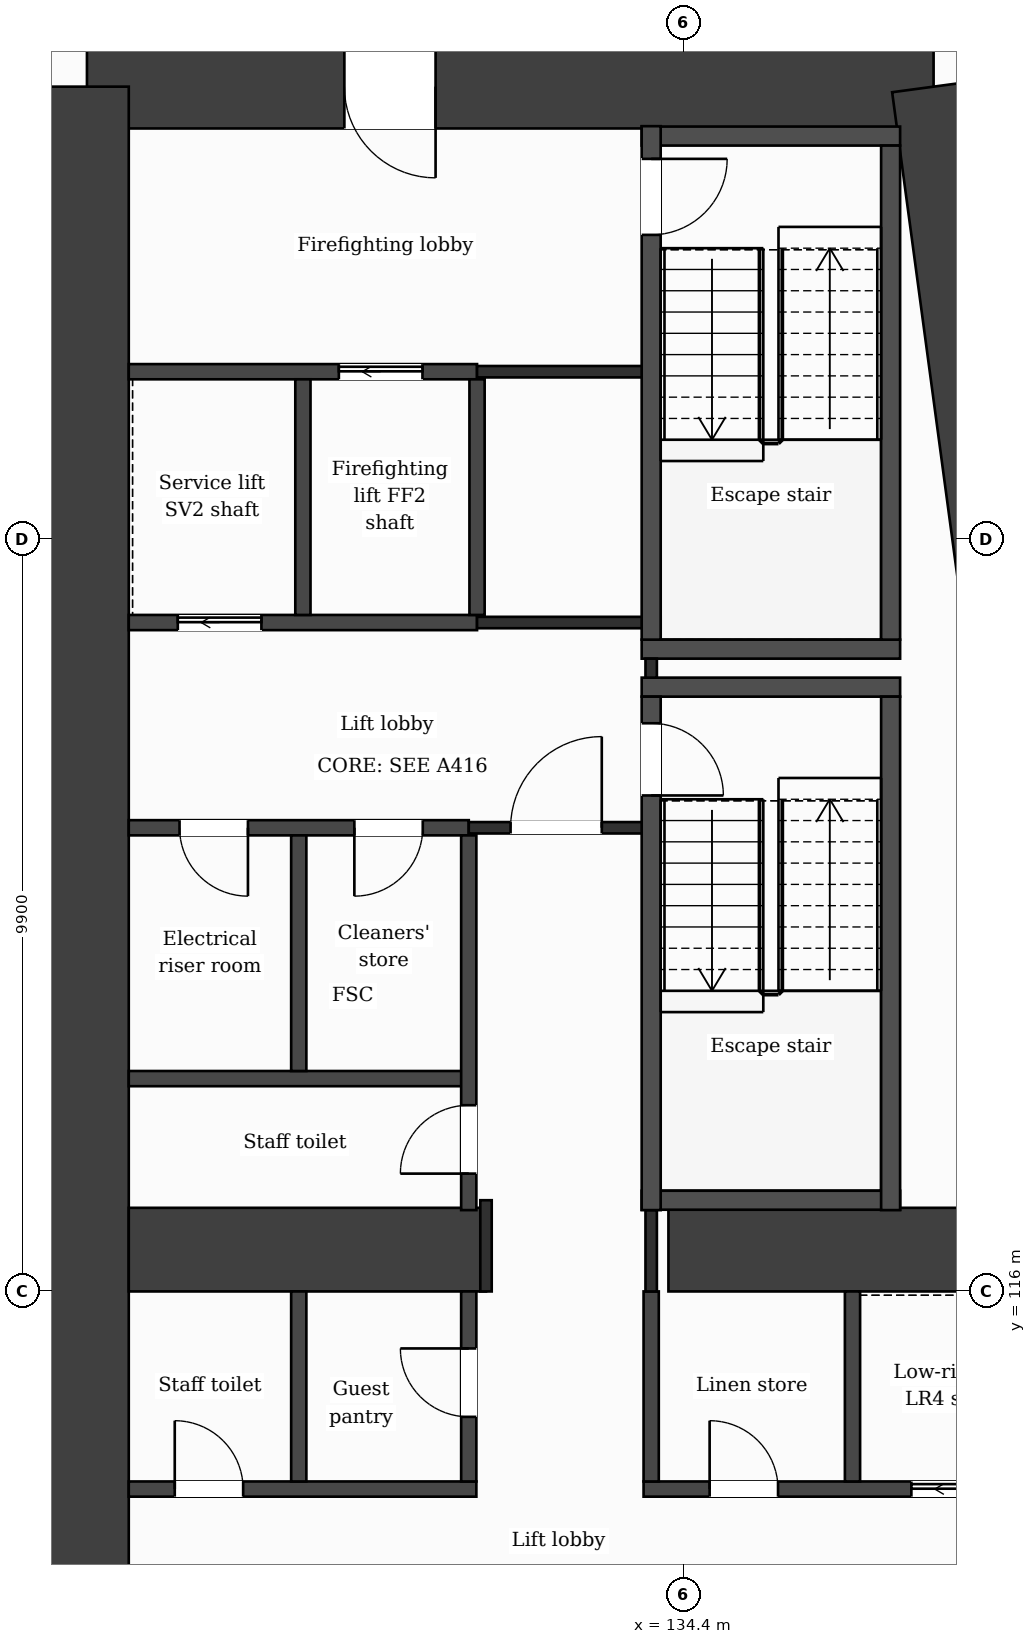
"""IFC4 building model, lengths in metres.
Left out: names, types, materials, properties, quantities, classifications, styles, units other than length and angle.
Written with IfcOpenShell. Run it as: python <this file> out.ifc"""

import sys

from ifc_helpers import new_model, si_unit, direction, frame, frame_2d, origin, place, context, subcontext, project, spatial, rectangle, extrude, element, fill, save


model = new_model("IFC4")
c1 = context("Model", 3, precision=1e-05, world=origin(), true_north=direction((0.0, 1.0)))
c2 = subcontext(c1, "Body", "Model", "MODEL_VIEW")
j1 = project(units=[si_unit("LENGTHUNIT", "METRE"), si_unit("PLANEANGLEUNIT", "RADIAN")], contexts=[c1])
p1 = place(None, origin())
s1 = spatial("IfcSite", under=j1, at=p1, CompositionType="ELEMENT")
p2 = place(p1, origin())
s2 = spatial("IfcBuilding", under=s1, at=p2, CompositionType="ELEMENT")
p3 = place(p2, frame((0.0, 0.0, 70.5)))
s3 = spatial("IfcBuildingStorey", under=s2, at=p3, CompositionType="ELEMENT", Elevation=70.5)
p4 = place(p3, frame((126.55, 131.85, 0.0), z_axis=(0.0, 0.0, 1.0), x_axis=(1.0, 0.0, 0.0)))
e1 = element("IfcWall", 1, at=p4, inside=s3, PredefinedType="SHEAR", context=c2, shape_type="SweptSolid", body=[
    extrude(rectangle(XDim=11.138, YDim=1.1, at=frame_2d((5.569, 0.0))), origin(), (0.0, 0.0, 1.0), 3.5),
])
p5 = place(p4, frame((3.386, 0.0, 0.0)))
e2 = element("IfcOpeningElement", 2, at=p5, cuts=e1, PredefinedType="OPENING", context=c2, shape_type="SweptSolid", body=[
    extrude(rectangle(XDim=1.2, YDim=2.1, at=frame_2d((0.6, 1.05))), frame((0.0, 0.56, 0.0), z_axis=(0.0, -1.0, 0.0), x_axis=(1.0, 0.0, 0.0)), (0.0, 0.0, 1.0), 1.12),
])
p6 = place(p3, frame((137.688, 131.85, 0.0), z_axis=(0.0, 0.0, 1.0), x_axis=(0.133411793472, -0.991060691059, 0.0)))
e3 = element("IfcWall", 3, at=p6, inside=s3, PredefinedType="SHEAR", context=c2, shape_type="SweptSolid", body=[
    extrude(rectangle(XDim=21.089, YDim=1.1, at=frame_2d((10.544, 0.0))), origin(), (0.0, 0.0, 1.0), 3.5),
])
p7 = place(p3, frame((126.55, 110.95, 0.0), z_axis=(0.0, 0.0, 1.0), x_axis=(0.0, 1.0, 0.0)))
e4 = element("IfcWall", 4, at=p7, inside=s3, PredefinedType="SHEAR", context=c2, shape_type="SweptSolid", body=[
    extrude(rectangle(XDim=20.9, YDim=1.1, at=frame_2d((10.45, 0.0))), origin(), (0.0, 0.0, 1.0), 3.5),
])
p8 = place(p3, frame((127.1, 116.55, 0.0), z_axis=(0.0, 0.0, 1.0), x_axis=(1.0, 0.0, 0.0)))
e5 = element("IfcWall", 5, at=p8, inside=s3, PredefinedType="SHEAR", context=c2, shape_type="SweptSolid", body=[
    extrude(rectangle(XDim=4.7, YDim=1.1, at=frame_2d((2.35, 0.0))), origin(), (0.0, 0.0, 1.0), 3.5),
])
p9 = place(p3, frame((134.2, 116.55, 0.0), z_axis=(0.0, 0.0, 1.0), x_axis=(1.0, 0.0, 0.0)))
e6 = element("IfcWall", 6, at=p9, inside=s3, PredefinedType="SHEAR", context=c2, shape_type="SweptSolid", body=[
    extrude(rectangle(XDim=5.077, YDim=1.1, at=frame_2d((2.539, 0.0))), origin(), (0.0, 0.0, 1.0), 3.5),
])
p10 = place(p3, frame((127.1, 113.4, 0.0), z_axis=(0.0, 0.0, 1.0), x_axis=(1.0, 0.0, 0.0)))
e7 = element("IfcWall", 7, at=p10, inside=s3, PredefinedType="PARTITIONING", context=c2, shape_type="SweptSolid", body=[
    extrude(rectangle(XDim=4.573, YDim=0.2, at=frame_2d((2.287, 0.0))), origin(), (0.0, 0.0, 1.0), 3.18),
])
p11 = place(p10, frame((0.605, 0.0, 0.0)))
e8 = element("IfcOpeningElement", 8, at=p11, cuts=e7, PredefinedType="OPENING", context=c2, shape_type="SweptSolid", body=[
    extrude(rectangle(XDim=0.9, YDim=2.1, at=frame_2d((0.45, 1.05))), frame((0.0, 0.11, 0.0), z_axis=(0.0, -1.0, 0.0), x_axis=(1.0, 0.0, 0.0)), (0.0, 0.0, 1.0), 0.22),
])
p12 = place(p3, frame((133.873, 113.4, 0.0), z_axis=(0.0, 0.0, 1.0), x_axis=(1.0, 0.0, 0.0)))
e9 = element("IfcWall", 9, at=p12, inside=s3, PredefinedType="PARTITIONING", context=c2, shape_type="SweptSolid", body=[
    extrude(rectangle(XDim=5.774, YDim=0.2, at=frame_2d((2.887, 0.0))), origin(), (0.0, 0.0, 1.0), 3.18),
])
p13 = place(p12, frame((3.523, 0.0, 0.0)))
e10 = element("IfcOpeningElement", 10, at=p13, cuts=e9, PredefinedType="OPENING", context=c2, shape_type="SweptSolid", body=[
    extrude(rectangle(XDim=1.1, YDim=2.1, at=frame_2d((0.55, 1.05))), frame((0.0, 0.11, 0.0), z_axis=(0.0, -1.0, 0.0), x_axis=(1.0, 0.0, 0.0)), (0.0, 0.0, 1.0), 0.22),
])
p14 = place(p12, frame((0.869, 0.0, 0.0)))
e11 = element("IfcOpeningElement", 11, at=p14, cuts=e9, PredefinedType="OPENING", context=c2, shape_type="SweptSolid", body=[
    extrude(rectangle(XDim=0.9, YDim=2.1, at=frame_2d((0.45, 1.05))), frame((0.0, 0.11, 0.0), z_axis=(0.0, -1.0, 0.0), x_axis=(1.0, 0.0, 0.0)), (0.0, 0.0, 1.0), 0.22),
])
p15 = place(p3, frame((133.848, 117.2, 0.0), z_axis=(0.0, 0.0, 1.0), x_axis=(1.0, 0.0, 0.0)))
e12 = element("IfcWall", 12, at=p15, inside=s3, PredefinedType="PARTITIONING", context=c2, shape_type="SweptSolid", body=[
    extrude(rectangle(XDim=3.4, YDim=0.25, at=frame_2d((1.7, 0.0))), origin(), (0.0, 0.0, 1.0), 3.18),
])
p16 = place(p3, frame((127.1, 118.8, 0.0), z_axis=(0.0, 0.0, 1.0), x_axis=(1.0, 0.0, 0.0)))
e13 = element("IfcWall", 13, at=p16, inside=s3, PredefinedType="PARTITIONING", context=c2, shape_type="SweptSolid", body=[
    extrude(rectangle(XDim=4.473, YDim=0.2, at=frame_2d((2.236, 0.0))), origin(), (0.0, 0.0, 1.0), 3.18),
])
p17 = place(p3, frame((127.1, 122.1, 0.0), z_axis=(0.0, 0.0, 1.0), x_axis=(1.0, 0.0, 0.0)))
e14 = element("IfcWall", 14, at=p17, inside=s3, PredefinedType="PARTITIONING", context=c2, shape_type="SweptSolid", body=[
    extrude(rectangle(XDim=4.473, YDim=0.2, at=frame_2d((2.236, 0.0))), origin(), (0.0, 0.0, 1.0), 3.18),
])
p18 = place(p17, frame((2.968, 0.0, 0.0)))
e15 = element("IfcOpeningElement", 15, at=p18, cuts=e14, PredefinedType="OPENING", context=c2, shape_type="SweptSolid", body=[
    extrude(rectangle(XDim=0.9, YDim=2.1, at=frame_2d((0.45, 1.05))), frame((0.0, 0.11, 0.0), z_axis=(0.0, -1.0, 0.0), x_axis=(1.0, 0.0, 0.0)), (0.0, 0.0, 1.0), 0.22),
])
p19 = place(p17, frame((0.668, 0.0, 0.0)))
e16 = element("IfcOpeningElement", 16, at=p19, cuts=e14, PredefinedType="OPENING", context=c2, shape_type="SweptSolid", body=[
    extrude(rectangle(XDim=0.9, YDim=2.1, at=frame_2d((0.45, 1.05))), frame((0.0, 0.11, 0.0), z_axis=(0.0, -1.0, 0.0), x_axis=(1.0, 0.0, 0.0)), (0.0, 0.0, 1.0), 0.22),
])
p20 = place(p3, frame((131.573, 122.1, 0.0), z_axis=(0.0, 0.0, 1.0), x_axis=(1.0, 0.0, 0.0)))
e17 = element("IfcWall", 17, at=p20, inside=s3, PredefinedType="PARTITIONING", context=c2, shape_type="SweptSolid", body=[
    extrude(rectangle(XDim=2.4, YDim=0.15, at=frame_2d((1.2, 0.0))), origin(), (0.0, 0.0, 1.0), 3.18),
])
p21 = place(p20, frame((0.55, 0.0, 0.0)))
e18 = element("IfcOpeningElement", 18, at=p21, cuts=e17, PredefinedType="OPENING", context=c2, shape_type="SweptSolid", body=[
    extrude(rectangle(XDim=1.2, YDim=2.1, at=frame_2d((0.6, 1.05))), frame((0.0, 0.085, 0.0), z_axis=(0.0, -1.0, 0.0), x_axis=(1.0, 0.0, 0.0)), (0.0, 0.0, 1.0), 0.17),
])
for number, where, z_axis, x_axis in (
    (19, (133.848, 123.95, 0.0), (0.0, 0.0, 1.0), (1.0, 0.0, 0.0)),
    (20, (133.848, 124.45, 0.0), (0.0, 0.0, 1.0), (1.0, 0.0, 0.0)),
):
    element("IfcWall", number, at=place(p3, frame(where, z_axis=z_axis, x_axis=x_axis)), inside=s3, PredefinedType="PARTITIONING", context=c2, shape_type="SweptSolid", body=[
        extrude(rectangle(XDim=3.4, YDim=0.25, at=frame_2d((1.7, 0.0))), origin(), (0.0, 0.0, 1.0), 3.18),
    ])
p22 = place(p3, frame((127.1, 124.8, 0.0), z_axis=(0.0, 0.0, 1.0), x_axis=(1.0, 0.0, 0.0)))
e21 = element("IfcWall", 21, at=p22, inside=s3, PredefinedType="PARTITIONING", context=c2, shape_type="SweptSolid", body=[
    extrude(rectangle(XDim=4.582, YDim=0.2, at=frame_2d((2.291, 0.0))), origin(), (0.0, 0.0, 1.0), 3.18),
])
p23 = place(p22, frame((0.645, 0.0, 0.0)))
e22 = element("IfcOpeningElement", 22, at=p23, cuts=e21, PredefinedType="OPENING", context=c2, shape_type="SweptSolid", body=[
    extrude(rectangle(XDim=1.1, YDim=2.1, at=frame_2d((0.55, 1.05))), frame((0.0, 0.11, 0.0), z_axis=(0.0, -1.0, 0.0), x_axis=(1.0, 0.0, 0.0)), (0.0, 0.0, 1.0), 0.22),
])
p24 = place(p3, frame((131.682, 124.8, 0.0), z_axis=(0.0, 0.0, 1.0), x_axis=(1.0, 0.0, 0.0)))
e23 = element("IfcWall", 23, at=p24, inside=s3, PredefinedType="PARTITIONING", context=c2, shape_type="SweptSolid", body=[
    extrude(rectangle(XDim=2.416, YDim=0.15, at=frame_2d((1.208, 0.0))), origin(), (0.0, 0.0, 1.0), 3.18),
])
p25 = place(p3, frame((127.1, 128.1, 0.0), z_axis=(0.0, 0.0, 1.0), x_axis=(1.0, 0.0, 0.0)))
e24 = element("IfcWall", 24, at=p25, inside=s3, PredefinedType="PARTITIONING", context=c2, shape_type="SweptSolid", body=[
    extrude(rectangle(XDim=4.582, YDim=0.2, at=frame_2d((2.291, 0.0))), origin(), (0.0, 0.0, 1.0), 3.18),
])
p26 = place(p25, frame((2.764, 0.0, 0.0)))
e25 = element("IfcOpeningElement", 25, at=p26, cuts=e24, PredefinedType="OPENING", context=c2, shape_type="SweptSolid", body=[
    extrude(rectangle(XDim=1.1, YDim=2.1, at=frame_2d((0.55, 1.05))), frame((0.0, 0.11, 0.0), z_axis=(0.0, -1.0, 0.0), x_axis=(1.0, 0.0, 0.0)), (0.0, 0.0, 1.0), 0.22),
])
p27 = place(p3, frame((131.682, 128.1, 0.0), z_axis=(0.0, 0.0, 1.0), x_axis=(1.0, 0.0, 0.0)))
e26 = element("IfcWall", 26, at=p27, inside=s3, PredefinedType="PARTITIONING", context=c2, shape_type="SweptSolid", body=[
    extrude(rectangle(XDim=2.291, YDim=0.15, at=frame_2d((1.146, 0.0))), origin(), (0.0, 0.0, 1.0), 3.18),
])
p28 = place(p3, frame((133.848, 131.2, 0.0), z_axis=(0.0, 0.0, 1.0), x_axis=(1.0, 0.0, 0.0)))
e27 = element("IfcWall", 27, at=p28, inside=s3, PredefinedType="PARTITIONING", context=c2, shape_type="SweptSolid", body=[
    extrude(rectangle(XDim=3.4, YDim=0.25, at=frame_2d((1.7, 0.0))), origin(), (0.0, 0.0, 1.0), 3.18),
])
p29 = place(p3, frame((129.336, 113.5, 0.0), z_axis=(0.0, 0.0, 1.0), x_axis=(0.0, 1.0, 0.0)))
e28 = element("IfcWall", 28, at=p29, inside=s3, PredefinedType="PARTITIONING", context=c2, shape_type="SweptSolid", body=[
    extrude(rectangle(XDim=2.5, YDim=0.2, at=frame_2d((1.25, 0.0))), origin(), (0.0, 0.0, 1.0), 3.18),
])
for number, where, z_axis, x_axis in (
    (29, (129.336, 118.9, 0.0), (0.0, 0.0, 1.0), (0.0, 1.0, 0.0)),
    (30, (129.391, 124.9, 0.0), (0.0, 0.0, 1.0), (0.0, 1.0, 0.0)),
):
    element("IfcWall", number, at=place(p3, frame(where, z_axis=z_axis, x_axis=x_axis)), inside=s3, PredefinedType="PARTITIONING", context=c2, shape_type="SweptSolid", body=[
        extrude(rectangle(XDim=3.1, YDim=0.2, at=frame_2d((1.55, 0.0))), origin(), (0.0, 0.0, 1.0), 3.18),
    ])
p30 = place(p3, frame((131.573, 113.5, 0.0), z_axis=(0.0, 0.0, 1.0), x_axis=(0.0, 1.0, 0.0)))
e31 = element("IfcWall", 31, at=p30, inside=s3, PredefinedType="PARTITIONING", context=c2, shape_type="SweptSolid", body=[
    extrude(rectangle(XDim=2.5, YDim=0.2, at=frame_2d((1.25, 0.0))), origin(), (0.0, 0.0, 1.0), 3.18),
])
p31 = place(p30, frame((0.85, 0.0, 0.0)))
e32 = element("IfcOpeningElement", 32, at=p31, cuts=e31, PredefinedType="OPENING", context=c2, shape_type="SweptSolid", body=[
    extrude(rectangle(XDim=0.9, YDim=2.1, at=frame_2d((0.45, 1.05))), frame((0.0, 0.11, 0.0), z_axis=(0.0, -1.0, 0.0), x_axis=(1.0, 0.0, 0.0)), (0.0, 0.0, 1.0), 0.22),
])
p32 = place(p3, frame((131.573, 117.07, 0.0), z_axis=(0.0, 0.0, 1.0), x_axis=(0.0, 1.0, 0.0)))
e33 = element("IfcWall", 33, at=p32, inside=s3, PredefinedType="PARTITIONING", context=c2, shape_type="SweptSolid", body=[
    extrude(rectangle(XDim=4.93, YDim=0.2, at=frame_2d((2.465, 0.0))), origin(), (0.0, 0.0, 1.0), 3.18),
])
p33 = place(p32, frame((0.48, 0.0, 0.0)))
e34 = element("IfcOpeningElement", 34, at=p33, cuts=e33, PredefinedType="OPENING", context=c2, shape_type="SweptSolid", body=[
    extrude(rectangle(XDim=0.9, YDim=2.1, at=frame_2d((0.45, 1.05))), frame((0.0, 0.11, 0.0), z_axis=(0.0, -1.0, 0.0), x_axis=(1.0, 0.0, 0.0)), (0.0, 0.0, 1.0), 0.22),
])
p34 = place(p3, frame((131.682, 124.9, 0.0), z_axis=(0.0, 0.0, 1.0), x_axis=(0.0, 1.0, 0.0)))
e35 = element("IfcWall", 35, at=p34, inside=s3, PredefinedType="PARTITIONING", context=c2, shape_type="SweptSolid", body=[
    extrude(rectangle(XDim=3.1, YDim=0.2, at=frame_2d((1.55, 0.0))), origin(), (0.0, 0.0, 1.0), 3.18),
])
p35 = place(p3, frame((131.8, 116.0, 0.0), z_axis=(0.0, 0.0, 1.0), x_axis=(0.0, 1.0, 0.0)))
e36 = element("IfcWall", 36, at=p35, inside=s3, PredefinedType="PARTITIONING", context=c2, shape_type="SweptSolid", body=[
    extrude(rectangle(XDim=1.2, YDim=0.15, at=frame_2d((0.6, 0.0))), origin(), (0.0, 0.0, 1.0), 3.18),
])
p36 = place(p3, frame((133.973, 113.5, 0.0), z_axis=(0.0, 0.0, 1.0), x_axis=(0.0, 1.0, 0.0)))
e37 = element("IfcWall", 37, at=p36, inside=s3, PredefinedType="PARTITIONING", context=c2, shape_type="SweptSolid", body=[
    extrude(rectangle(XDim=2.5, YDim=0.2, at=frame_2d((1.25, 0.0))), origin(), (0.0, 0.0, 1.0), 3.18),
])
p37 = place(p3, frame((133.973, 116.0, 0.0), z_axis=(0.0, 0.0, 1.0), x_axis=(0.0, 1.0, 0.0)))
e38 = element("IfcWall", 38, at=p37, inside=s3, PredefinedType="PARTITIONING", context=c2, shape_type="SweptSolid", body=[
    extrude(rectangle(XDim=1.07, YDim=0.15, at=frame_2d((0.535, 0.0))), origin(), (0.0, 0.0, 1.0), 3.18),
])
p38 = place(p3, frame((133.973, 124.075, 0.0), z_axis=(0.0, 0.0, 1.0), x_axis=(0.0, 1.0, 0.0)))
e39 = element("IfcWall", 39, at=p38, inside=s3, PredefinedType="PARTITIONING", context=c2, shape_type="SweptSolid", body=[
    extrude(rectangle(XDim=0.25, YDim=0.15, at=frame_2d((0.125, 0.0))), origin(), (0.0, 0.0, 1.0), 3.18),
])
p39 = place(p3, frame((133.973, 117.07, 0.0), z_axis=(0.0, 0.0, 1.0), x_axis=(0.0, 1.0, 0.0)))
e40 = element("IfcWall", 40, at=p39, inside=s3, PredefinedType="PARTITIONING", context=c2, shape_type="SweptSolid", body=[
    extrude(rectangle(XDim=6.755, YDim=0.25, at=frame_2d((3.377, 0.0))), origin(), (0.0, 0.0, 1.0), 3.18),
])
p40 = place(p39, frame((5.455, 0.0, 0.0)))
e41 = element("IfcOpeningElement", 41, at=p40, cuts=e40, PredefinedType="OPENING", context=c2, shape_type="SweptSolid", body=[
    extrude(rectangle(XDim=0.95, YDim=2.1, at=frame_2d((0.475, 1.05))), frame((0.0, 0.135, 0.0), z_axis=(0.0, -1.0, 0.0), x_axis=(1.0, 0.0, 0.0)), (0.0, 0.0, 1.0), 0.27),
])
p41 = place(p3, frame((133.973, 124.575, 0.0), z_axis=(0.0, 0.0, 1.0), x_axis=(0.0, 1.0, 0.0)))
e42 = element("IfcWall", 42, at=p41, inside=s3, PredefinedType="PARTITIONING", context=c2, shape_type="SweptSolid", body=[
    extrude(rectangle(XDim=6.755, YDim=0.25, at=frame_2d((3.377, 0.0))), origin(), (0.0, 0.0, 1.0), 3.18),
])
p42 = place(p41, frame((5.325, 0.0, 0.0)))
e43 = element("IfcOpeningElement", 43, at=p42, cuts=e42, PredefinedType="OPENING", context=c2, shape_type="SweptSolid", body=[
    extrude(rectangle(XDim=1.0, YDim=2.1, at=frame_2d((0.5, 1.05))), frame((0.0, 0.135, 0.0), z_axis=(0.0, -1.0, 0.0), x_axis=(1.0, 0.0, 0.0)), (0.0, 0.0, 1.0), 0.27),
])
p43 = place(p3, frame((136.622, 113.5, 0.0), z_axis=(0.0, 0.0, 1.0), x_axis=(0.0, 1.0, 0.0)))
e44 = element("IfcWall", 44, at=p43, inside=s3, PredefinedType="PARTITIONING", context=c2, shape_type="SweptSolid", body=[
    extrude(rectangle(XDim=2.5, YDim=0.2, at=frame_2d((1.25, 0.0))), origin(), (0.0, 0.0, 1.0), 3.18),
])
p44 = place(p3, frame((137.123, 117.07, 0.0), z_axis=(0.0, 0.0, 1.0), x_axis=(0.0, 1.0, 0.0)))
e45 = element("IfcWall", 45, at=p44, inside=s3, PredefinedType="PARTITIONING", context=c2, shape_type="SweptSolid", body=[
    extrude(rectangle(XDim=6.755, YDim=0.25, at=frame_2d((3.377, 0.0))), origin(), (0.0, 0.0, 1.0), 3.18),
])
p45 = place(p3, frame((137.123, 124.575, 0.0), z_axis=(0.0, 0.0, 1.0), x_axis=(0.0, 1.0, 0.0)))
e46 = element("IfcWall", 46, at=p45, inside=s3, PredefinedType="PARTITIONING", context=c2, shape_type="SweptSolid", body=[
    extrude(rectangle(XDim=6.5, YDim=0.25, at=frame_2d((3.25, 0.0))), origin(), (0.0, 0.0, 1.0), 3.18),
])
p46 = place(p21, origin())
e47 = element("IfcDoor", 47, at=p46, inside=s3, OperationType="SINGLE_SWING_RIGHT", PredefinedType="DOOR", context=c2, shape_type="SweptSolid", body=[
    extrude(rectangle(XDim=1.2, YDim=2.1, at=frame_2d((0.6, 1.05))), frame((0.0, 0.025, 0.0), z_axis=(0.0, -1.0, 0.0), x_axis=(1.0, 0.0, 0.0)), (0.0, 0.0, 1.0), 0.05),
])
fill(e18, e47)
p47 = place(p26, origin())
e48 = element("IfcDoor", 48, at=p47, inside=s3, OperationType="SLIDING_TO_LEFT", PredefinedType="DOOR", context=c2, shape_type="SweptSolid", body=[
    extrude(rectangle(XDim=1.1, YDim=2.1, at=frame_2d((0.55, 1.05))), frame((0.0, 0.025, 0.0), z_axis=(0.0, -1.0, 0.0), x_axis=(1.0, 0.0, 0.0)), (0.0, 0.0, 1.0), 0.05),
])
fill(e25, e48)
p48 = place(p23, origin())
e49 = element("IfcDoor", 49, at=p48, inside=s3, OperationType="SLIDING_TO_LEFT", PredefinedType="DOOR", context=c2, shape_type="SweptSolid", body=[
    extrude(rectangle(XDim=1.1, YDim=2.1, at=frame_2d((0.55, 1.05))), frame((0.0, 0.025, 0.0), z_axis=(0.0, -1.0, 0.0), x_axis=(1.0, 0.0, 0.0)), (0.0, 0.0, 1.0), 0.05),
])
fill(e22, e49)
p49 = place(p18, origin())
e50 = element("IfcDoor", 50, at=p49, inside=s3, OperationType="SINGLE_SWING_LEFT", PredefinedType="DOOR", context=c2, shape_type="SweptSolid", body=[
    extrude(rectangle(XDim=0.9, YDim=2.1, at=frame_2d((0.45, 1.05))), frame((0.0, 0.025, 0.0), z_axis=(0.0, -1.0, 0.0), x_axis=(1.0, 0.0, 0.0)), (0.0, 0.0, 1.0), 0.05),
])
fill(e15, e50)
p50 = place(p19, origin())
e51 = element("IfcDoor", 51, at=p50, inside=s3, OperationType="SINGLE_SWING_RIGHT", PredefinedType="DOOR", context=c2, shape_type="SweptSolid", body=[
    extrude(rectangle(XDim=0.9, YDim=2.1, at=frame_2d((0.45, 1.05))), frame((0.0, 0.025, 0.0), z_axis=(0.0, -1.0, 0.0), x_axis=(1.0, 0.0, 0.0)), (0.0, 0.0, 1.0), 0.05),
])
fill(e16, e51)
p51 = place(p40, origin())
e52 = element("IfcDoor", 52, at=p51, inside=s3, OperationType="SINGLE_SWING_LEFT", PredefinedType="DOOR", context=c2, shape_type="SweptSolid", body=[
    extrude(rectangle(XDim=0.95, YDim=2.1, at=frame_2d((0.475, 1.05))), frame((0.0, 0.025, 0.0), z_axis=(0.0, -1.0, 0.0), x_axis=(1.0, 0.0, 0.0)), (0.0, 0.0, 1.0), 0.05),
])
fill(e41, e52)
p52 = place(p42, origin())
e53 = element("IfcDoor", 53, at=p52, inside=s3, OperationType="SINGLE_SWING_RIGHT", PredefinedType="DOOR", context=c2, shape_type="SweptSolid", body=[
    extrude(rectangle(XDim=1.0, YDim=2.1, at=frame_2d((0.5, 1.05))), frame((0.0, 0.025, 0.0), z_axis=(0.0, -1.0, 0.0), x_axis=(1.0, 0.0, 0.0)), (0.0, 0.0, 1.0), 0.05),
])
fill(e43, e53)
p53 = place(p33, origin())
e54 = element("IfcDoor", 54, at=p53, inside=s3, OperationType="SINGLE_SWING_LEFT", PredefinedType="DOOR", context=c2, shape_type="SweptSolid", body=[
    extrude(rectangle(XDim=0.9, YDim=2.1, at=frame_2d((0.45, 1.05))), frame((0.0, 0.025, 0.0), z_axis=(0.0, -1.0, 0.0), x_axis=(1.0, 0.0, 0.0)), (0.0, 0.0, 1.0), 0.05),
])
fill(e34, e54)
p54 = place(p13, origin())
e55 = element("IfcDoor", 55, at=p54, inside=s3, OperationType="SLIDING_TO_LEFT", PredefinedType="DOOR", context=c2, shape_type="SweptSolid", body=[
    extrude(rectangle(XDim=1.1, YDim=2.1, at=frame_2d((0.55, 1.05))), frame((0.0, 0.025, 0.0), z_axis=(0.0, -1.0, 0.0), x_axis=(1.0, 0.0, 0.0)), (0.0, 0.0, 1.0), 0.05),
])
fill(e10, e55)
p55 = place(p14, origin())
e56 = element("IfcDoor", 56, at=p55, inside=s3, OperationType="SINGLE_SWING_LEFT", PredefinedType="DOOR", context=c2, shape_type="SweptSolid", body=[
    extrude(rectangle(XDim=0.9, YDim=2.1, at=frame_2d((0.45, 1.05))), frame((0.0, 0.025, 0.0), z_axis=(0.0, -1.0, 0.0), x_axis=(1.0, 0.0, 0.0)), (0.0, 0.0, 1.0), 0.05),
])
fill(e11, e56)
p56 = place(p31, origin())
e57 = element("IfcDoor", 57, at=p56, inside=s3, OperationType="SINGLE_SWING_RIGHT", PredefinedType="DOOR", context=c2, shape_type="SweptSolid", body=[
    extrude(rectangle(XDim=0.9, YDim=2.1, at=frame_2d((0.45, 1.05))), frame((0.0, 0.025, 0.0), z_axis=(0.0, -1.0, 0.0), x_axis=(1.0, 0.0, 0.0)), (0.0, 0.0, 1.0), 0.05),
])
fill(e32, e57)
p57 = place(p11, origin())
e58 = element("IfcDoor", 58, at=p57, inside=s3, OperationType="SINGLE_SWING_LEFT", PredefinedType="DOOR", context=c2, shape_type="SweptSolid", body=[
    extrude(rectangle(XDim=0.9, YDim=2.1, at=frame_2d((0.45, 1.05))), frame((0.0, 0.025, 0.0), z_axis=(0.0, -1.0, 0.0), x_axis=(1.0, 0.0, 0.0)), (0.0, 0.0, 1.0), 0.05),
])
fill(e8, e58)
p58 = place(p5, origin())
e59 = element("IfcDoor", 59, at=p58, inside=s3, OperationType="SINGLE_SWING_RIGHT", PredefinedType="DOOR", context=c2, shape_type="SweptSolid", body=[
    extrude(rectangle(XDim=1.2, YDim=2.1, at=frame_2d((0.6, 1.05))), frame((0.0, 0.025, 0.0), z_axis=(0.0, -1.0, 0.0), x_axis=(1.0, 0.0, 0.0)), (0.0, 0.0, 1.0), 0.05),
])
fill(e2, e59)
save(model, sys.argv[1])
